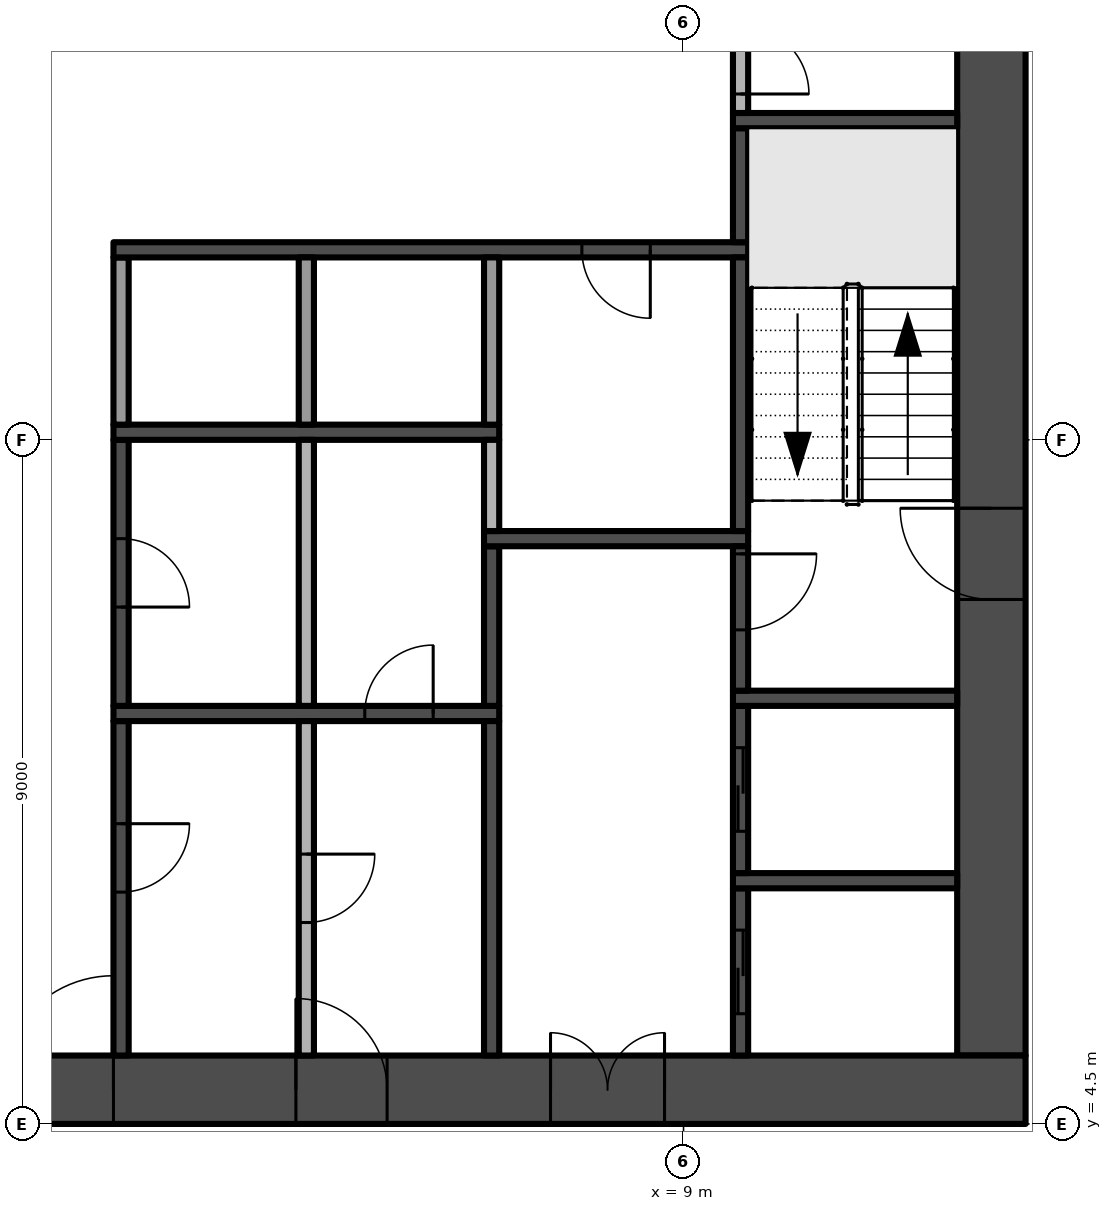
"""IFC4 building model, lengths in metres.
Left out: names, types, materials, properties, quantities, classifications, styles, units other than length and angle.
Written with IfcOpenShell. Run it as: python <this file> out.ifc"""

import sys

from ifc_helpers import new_model, si_unit, direction, frame, frame_2d, origin, place, context, subcontext, project, spatial, rectangle, extrude, element, fill, save


model = new_model("IFC4")
c1 = context("Model", 3, precision=1e-05, world=origin(), true_north=direction((0.0, 1.0)))
c2 = subcontext(c1, "Body", "Model", "MODEL_VIEW")
j1 = project(units=[si_unit("LENGTHUNIT", "METRE"), si_unit("PLANEANGLEUNIT", "RADIAN")], contexts=[c1])
p1 = place(None, origin())
s1 = spatial("IfcSite", under=j1, at=p1, CompositionType="ELEMENT")
p2 = place(p1, origin())
s2 = spatial("IfcBuilding", under=s1, at=p2, CompositionType="ELEMENT")
p3 = place(p2, frame((0.0, 0.0, 34.0)))
s3 = spatial("IfcBuildingStorey", under=s2, at=p3, CompositionType="ELEMENT", Elevation=34.0)
p4 = place(p3, frame((-13.5, 4.95, -0.3), z_axis=(0.0, 0.0, 1.0), x_axis=(1.0, 0.0, 0.0)))
e1 = element("IfcWall", 1, at=p4, inside=s3, PredefinedType="SHEAR", context=c2, shape_type="SweptSolid", body=[
    extrude(rectangle(XDim=27.0, YDim=0.9, at=frame_2d((13.5, 0.0))), origin(), (0.0, 0.0, 1.0), 3.8),
])
p5 = place(p4, frame((12.0, 0.0, 0.3)))
e2 = element("IfcOpeningElement", 2, at=p5, cuts=e1, PredefinedType="OPENING", context=c2, shape_type="SweptSolid", body=[
    extrude(rectangle(XDim=3.0, YDim=2.4, at=frame_2d((1.5, 1.2))), frame((0.0, 0.46, 0.0), z_axis=(0.0, -1.0, 0.0), x_axis=(1.0, 0.0, 0.0)), (0.0, 0.0, 1.0), 0.92),
])
p6 = place(p4, frame((4.9, 0.0, 0.3)))
e3 = element("IfcOpeningElement", 3, at=p6, cuts=e1, PredefinedType="OPENING", context=c2, shape_type="SweptSolid", body=[
    extrude(rectangle(XDim=1.2, YDim=2.2, at=frame_2d((0.6, 1.1))), frame((0.0, 0.46, 0.0), z_axis=(0.0, -1.0, 0.0), x_axis=(1.0, 0.0, 0.0)), (0.0, 0.0, 1.0), 0.92),
])
p7 = place(p4, frame((20.75, 0.0, 0.3)))
e4 = element("IfcOpeningElement", 4, at=p7, cuts=e1, PredefinedType="OPENING", context=c2, shape_type="SweptSolid", body=[
    extrude(rectangle(XDim=1.5, YDim=2.2, at=frame_2d((0.75, 1.1))), frame((0.0, 0.46, 0.0), z_axis=(0.0, -1.0, 0.0), x_axis=(1.0, 0.0, 0.0)), (0.0, 0.0, 1.0), 0.92),
])
p8 = place(p4, frame((17.4, 0.0, 0.3)))
e5 = element("IfcOpeningElement", 5, at=p8, cuts=e1, PredefinedType="OPENING", context=c2, shape_type="SweptSolid", body=[
    extrude(rectangle(XDim=1.2, YDim=2.2, at=frame_2d((0.6, 1.1))), frame((0.0, 0.46, 0.0), z_axis=(0.0, -1.0, 0.0), x_axis=(1.0, 0.0, 0.0)), (0.0, 0.0, 1.0), 0.92),
])
p9 = place(p3, frame((13.05, 5.4, -0.3), z_axis=(0.0, 0.0, 1.0), x_axis=(0.0, 1.0, 0.0)))
e6 = element("IfcWall", 6, at=p9, inside=s3, PredefinedType="SHEAR", context=c2, shape_type="SweptSolid", body=[
    extrude(rectangle(XDim=16.2, YDim=0.9, at=frame_2d((8.1, 0.0))), origin(), (0.0, 0.0, 1.0), 3.8),
])
p10 = place(p9, frame((6.0, 0.0, 0.3)))
e7 = element("IfcOpeningElement", 7, at=p10, cuts=e6, PredefinedType="OPENING", context=c2, shape_type="SweptSolid", body=[
    extrude(rectangle(XDim=1.2, YDim=2.2, at=frame_2d((0.6, 1.1))), frame((0.0, 0.46, 0.0), z_axis=(0.0, -1.0, 0.0), x_axis=(1.0, 0.0, 0.0)), (0.0, 0.0, 1.0), 0.92),
])
p11 = place(p3, frame((1.6, 9.8, 0.0), z_axis=(0.0, 0.0, 1.0), x_axis=(0.0, -1.0, 0.0)))
e8 = element("IfcWall", 8, at=p11, inside=s3, PredefinedType="SHEAR", context=c2, shape_type="SweptSolid", body=[
    extrude(rectangle(XDim=4.4, YDim=0.2, at=frame_2d((2.2, 0.0))), origin(), (0.0, 0.0, 1.0), 3.5),
])
p12 = place(p11, frame((1.35, 0.0, 0.0)))
e9 = element("IfcOpeningElement", 9, at=p12, cuts=e8, PredefinedType="OPENING", context=c2, shape_type="SweptSolid", body=[
    extrude(rectangle(XDim=0.9, YDim=2.1, at=frame_2d((0.45, 1.05))), frame((0.0, 0.11, 0.0), z_axis=(0.0, -1.0, 0.0), x_axis=(1.0, 0.0, 0.0)), (0.0, 0.0, 1.0), 0.22),
])
p13 = place(p3, frame((1.5, 9.9, 0.0), z_axis=(0.0, 0.0, 1.0), x_axis=(1.0, 0.0, 0.0)))
e10 = element("IfcWall", 10, at=p13, inside=s3, PredefinedType="SHEAR", context=c2, shape_type="SweptSolid", body=[
    extrude(rectangle(XDim=5.075, YDim=0.2, at=frame_2d((2.538, 0.0))), origin(), (0.0, 0.0, 1.0), 3.5),
])
p14 = place(p13, frame((3.306, 0.0, 0.0)))
e11 = element("IfcOpeningElement", 11, at=p14, cuts=e10, PredefinedType="OPENING", context=c2, shape_type="SweptSolid", body=[
    extrude(rectangle(XDim=0.9, YDim=2.1, at=frame_2d((0.45, 1.05))), frame((0.0, 0.11, 0.0), z_axis=(0.0, -1.0, 0.0), x_axis=(1.0, 0.0, 0.0)), (0.0, 0.0, 1.0), 0.22),
])
p15 = place(p3, frame((1.6, 13.5, 0.0), z_axis=(0.0, 0.0, 1.0), x_axis=(0.0, -1.0, 0.0)))
e12 = element("IfcWall", 12, at=p15, inside=s3, PredefinedType="SHEAR", context=c2, shape_type="SweptSolid", body=[
    extrude(rectangle(XDim=3.5, YDim=0.2, at=frame_2d((1.75, 0.0))), origin(), (0.0, 0.0, 1.0), 3.5),
])
p16 = place(p15, frame((1.3, 0.0, 0.0)))
e13 = element("IfcOpeningElement", 13, at=p16, cuts=e12, PredefinedType="OPENING", context=c2, shape_type="SweptSolid", body=[
    extrude(rectangle(XDim=0.9, YDim=2.1, at=frame_2d((0.45, 1.05))), frame((0.0, 0.11, 0.0), z_axis=(0.0, -1.0, 0.0), x_axis=(1.0, 0.0, 0.0)), (0.0, 0.0, 1.0), 0.22),
])
p17 = place(p3, frame((1.5, 13.6, 0.0), z_axis=(0.0, 0.0, 1.0), x_axis=(1.0, 0.0, 0.0)))
e14 = element("IfcWall", 14, at=p17, inside=s3, PredefinedType="SHEAR", context=c2, shape_type="SweptSolid", body=[
    extrude(rectangle(XDim=5.075, YDim=0.2, at=frame_2d((2.538, 0.0))), origin(), (0.0, 0.0, 1.0), 3.5),
])
p18 = place(p3, frame((1.6, 13.7, 0.0), z_axis=(0.0, 0.0, 1.0), x_axis=(0.0, 1.0, 0.0)))
e15 = element("IfcWall", 15, at=p18, inside=s3, PredefinedType="PARTITIONING", context=c2, shape_type="SweptSolid", body=[
    extrude(rectangle(XDim=2.2, YDim=0.2, at=frame_2d((1.1, 0.0))), origin(), (0.0, 0.0, 1.0), 3.5),
])
p19 = place(p3, frame((9.85, 16.0, 0.0), z_axis=(0.0, 0.0, 1.0), x_axis=(-1.0, 0.0, 0.0)))
e16 = element("IfcWall", 16, at=p19, inside=s3, PredefinedType="SHEAR", context=c2, shape_type="SweptSolid", body=[
    extrude(rectangle(XDim=8.35, YDim=0.2, at=frame_2d((4.175, 0.0))), origin(), (0.0, 0.0, 1.0), 3.5),
])
p20 = place(p19, frame((1.288, 0.0, 0.0)))
e17 = element("IfcOpeningElement", 17, at=p20, cuts=e16, PredefinedType="OPENING", context=c2, shape_type="SweptSolid", body=[
    extrude(rectangle(XDim=0.9, YDim=2.1, at=frame_2d((0.45, 1.05))), frame((0.0, 0.11, 0.0), z_axis=(0.0, -1.0, 0.0), x_axis=(1.0, 0.0, 0.0)), (0.0, 0.0, 1.0), 0.22),
])
p21 = place(p3, frame((4.037, 9.8, 0.0), z_axis=(0.0, 0.0, 1.0), x_axis=(0.0, -1.0, 0.0)))
e18 = element("IfcWall", 18, at=p21, inside=s3, PredefinedType="PARTITIONING", context=c2, shape_type="SweptSolid", body=[
    extrude(rectangle(XDim=4.4, YDim=0.2, at=frame_2d((2.2, 0.0))), origin(), (0.0, 0.0, 1.0), 3.5),
])
p22 = place(p21, frame((1.75, 0.0, 0.0)))
e19 = element("IfcOpeningElement", 19, at=p22, cuts=e18, PredefinedType="OPENING", context=c2, shape_type="SweptSolid", body=[
    extrude(rectangle(XDim=0.9, YDim=2.1, at=frame_2d((0.45, 1.05))), frame((0.0, 0.11, 0.0), z_axis=(0.0, -1.0, 0.0), x_axis=(1.0, 0.0, 0.0)), (0.0, 0.0, 1.0), 0.22),
])
p23 = place(p3, frame((4.037, 10.0, 0.0), z_axis=(0.0, 0.0, 1.0), x_axis=(0.0, 1.0, 0.0)))
e20 = element("IfcWall", 20, at=p23, inside=s3, PredefinedType="PARTITIONING", context=c2, shape_type="SweptSolid", body=[
    extrude(rectangle(XDim=3.5, YDim=0.2, at=frame_2d((1.75, 0.0))), origin(), (0.0, 0.0, 1.0), 3.5),
])
p24 = place(p3, frame((4.037, 13.7, 0.0), z_axis=(0.0, 0.0, 1.0), x_axis=(0.0, 1.0, 0.0)))
e21 = element("IfcWall", 21, at=p24, inside=s3, PredefinedType="PARTITIONING", context=c2, shape_type="SweptSolid", body=[
    extrude(rectangle(XDim=2.2, YDim=0.2, at=frame_2d((1.1, 0.0))), origin(), (0.0, 0.0, 1.0), 3.5),
])
p25 = place(p3, frame((6.475, 5.4, 0.0), z_axis=(0.0, 0.0, 1.0), x_axis=(0.0, 1.0, 0.0)))
e22 = element("IfcWall", 22, at=p25, inside=s3, PredefinedType="SHEAR", context=c2, shape_type="SweptSolid", body=[
    extrude(rectangle(XDim=4.4, YDim=0.2, at=frame_2d((2.2, 0.0))), origin(), (0.0, 0.0, 1.0), 3.5),
])
p26 = place(p3, frame((6.475, 10.0, 0.0), z_axis=(0.0, 0.0, 1.0), x_axis=(0.0, 1.0, 0.0)))
e23 = element("IfcWall", 23, at=p26, inside=s3, PredefinedType="SHEAR", context=c2, shape_type="SweptSolid", body=[
    extrude(rectangle(XDim=2.1, YDim=0.2, at=frame_2d((1.05, 0.0))), origin(), (0.0, 0.0, 1.0), 3.5),
])
p27 = place(p3, frame((6.375, 12.2, 0.0), z_axis=(0.0, 0.0, 1.0), x_axis=(1.0, 0.0, 0.0)))
e24 = element("IfcWall", 24, at=p27, inside=s3, PredefinedType="SHEAR", context=c2, shape_type="SweptSolid", body=[
    extrude(rectangle(XDim=3.475, YDim=0.2, at=frame_2d((1.738, 0.0))), origin(), (0.0, 0.0, 1.0), 3.5),
])
p28 = place(p3, frame((6.475, 12.3, 0.0), z_axis=(0.0, 0.0, 1.0), x_axis=(0.0, 1.0, 0.0)))
e25 = element("IfcWall", 25, at=p28, inside=s3, PredefinedType="PARTITIONING", context=c2, shape_type="SweptSolid", body=[
    extrude(rectangle(XDim=1.2, YDim=0.2, at=frame_2d((0.6, 0.0))), origin(), (0.0, 0.0, 1.0), 3.5),
])
p29 = place(p3, frame((6.475, 13.7, 0.0), z_axis=(0.0, 0.0, 1.0), x_axis=(0.0, 1.0, 0.0)))
e26 = element("IfcWall", 26, at=p29, inside=s3, PredefinedType="PARTITIONING", context=c2, shape_type="SweptSolid", body=[
    extrude(rectangle(XDim=2.2, YDim=0.2, at=frame_2d((1.1, 0.0))), origin(), (0.0, 0.0, 1.0), 3.5),
])
p30 = place(p3, frame((9.75, 5.4, 0.0), z_axis=(0.0, 0.0, 1.0), x_axis=(0.0, 1.0, 0.0)))
e27 = element("IfcWall", 27, at=p30, inside=s3, PredefinedType="SHEAR", context=c2, shape_type="SweptSolid", body=[
    extrude(rectangle(XDim=2.2, YDim=0.2, at=frame_2d((1.1, 0.0))), origin(), (0.0, 0.0, 1.0), 3.5),
])
p31 = place(p30, frame((0.55, 0.0, 0.0)))
e28 = element("IfcOpeningElement", 28, at=p31, cuts=e27, PredefinedType="OPENING", context=c2, shape_type="SweptSolid", body=[
    extrude(rectangle(XDim=1.1, YDim=2.1, at=frame_2d((0.55, 1.05))), frame((0.0, 0.11, 0.0), z_axis=(0.0, -1.0, 0.0), x_axis=(1.0, 0.0, 0.0)), (0.0, 0.0, 1.0), 0.22),
])
p32 = place(p3, frame((9.65, 7.7, 0.0), z_axis=(0.0, 0.0, 1.0), x_axis=(1.0, 0.0, 0.0)))
e29 = element("IfcWall", 29, at=p32, inside=s3, PredefinedType="SHEAR", context=c2, shape_type="SweptSolid", body=[
    extrude(rectangle(XDim=2.95, YDim=0.2, at=frame_2d((1.475, 0.0))), origin(), (0.0, 0.0, 1.0), 3.5),
])
p33 = place(p3, frame((9.75, 7.8, 0.0), z_axis=(0.0, 0.0, 1.0), x_axis=(0.0, 1.0, 0.0)))
e30 = element("IfcWall", 30, at=p33, inside=s3, PredefinedType="SHEAR", context=c2, shape_type="SweptSolid", body=[
    extrude(rectangle(XDim=2.2, YDim=0.2, at=frame_2d((1.1, 0.0))), origin(), (0.0, 0.0, 1.0), 3.5),
])
p34 = place(p33, frame((0.55, 0.0, 0.0)))
e31 = element("IfcOpeningElement", 31, at=p34, cuts=e30, PredefinedType="OPENING", context=c2, shape_type="SweptSolid", body=[
    extrude(rectangle(XDim=1.1, YDim=2.1, at=frame_2d((0.55, 1.05))), frame((0.0, 0.11, 0.0), z_axis=(0.0, -1.0, 0.0), x_axis=(1.0, 0.0, 0.0)), (0.0, 0.0, 1.0), 0.22),
])
p35 = place(p3, frame((9.65, 10.1, 0.0), z_axis=(0.0, 0.0, 1.0), x_axis=(1.0, 0.0, 0.0)))
e32 = element("IfcWall", 32, at=p35, inside=s3, PredefinedType="SHEAR", context=c2, shape_type="SweptSolid", body=[
    extrude(rectangle(XDim=2.95, YDim=0.2, at=frame_2d((1.475, 0.0))), origin(), (0.0, 0.0, 1.0), 3.5),
])
p36 = place(p3, frame((9.75, 12.1, 0.0), z_axis=(0.0, 0.0, 1.0), x_axis=(0.0, -1.0, 0.0)))
e33 = element("IfcWall", 33, at=p36, inside=s3, PredefinedType="SHEAR", context=c2, shape_type="SweptSolid", body=[
    extrude(rectangle(XDim=1.9, YDim=0.2, at=frame_2d((0.95, 0.0))), origin(), (0.0, 0.0, 1.0), 3.5),
])
p37 = place(p36, frame((0.1, 0.0, 0.0)))
e34 = element("IfcOpeningElement", 34, at=p37, cuts=e33, PredefinedType="OPENING", context=c2, shape_type="SweptSolid", body=[
    extrude(rectangle(XDim=1.0, YDim=2.2, at=frame_2d((0.5, 1.1))), frame((0.0, 0.11, 0.0), z_axis=(0.0, -1.0, 0.0), x_axis=(1.0, 0.0, 0.0)), (0.0, 0.0, 1.0), 0.22),
])
p38 = place(p3, frame((9.75, 12.3, 0.0), z_axis=(0.0, 0.0, 1.0), x_axis=(0.0, 1.0, 0.0)))
e35 = element("IfcWall", 35, at=p38, inside=s3, PredefinedType="SHEAR", context=c2, shape_type="SweptSolid", body=[
    extrude(rectangle(XDim=3.6, YDim=0.2, at=frame_2d((1.8, 0.0))), origin(), (0.0, 0.0, 1.0), 3.5),
])
p39 = place(p3, frame((9.75, 16.1, 0.0), z_axis=(0.0, 0.0, 1.0), x_axis=(0.0, 1.0, 0.0)))
e36 = element("IfcWall", 36, at=p39, inside=s3, PredefinedType="SHEAR", context=c2, shape_type="SweptSolid", body=[
    extrude(rectangle(XDim=1.5, YDim=0.2, at=frame_2d((0.75, 0.0))), origin(), (0.0, 0.0, 1.0), 3.5),
])
p40 = place(p3, frame((9.65, 17.7, 0.0), z_axis=(0.0, 0.0, 1.0), x_axis=(1.0, 0.0, 0.0)))
e37 = element("IfcWall", 37, at=p40, inside=s3, PredefinedType="SHEAR", context=c2, shape_type="SweptSolid", body=[
    extrude(rectangle(XDim=2.95, YDim=0.2, at=frame_2d((1.475, 0.0))), origin(), (0.0, 0.0, 1.0), 3.5),
])
p41 = place(p3, frame((9.75, 19.2, 0.0), z_axis=(0.0, 0.0, 1.0), x_axis=(0.0, -1.0, 0.0)))
e38 = element("IfcWall", 38, at=p41, inside=s3, PredefinedType="PARTITIONING", context=c2, shape_type="SweptSolid", body=[
    extrude(rectangle(XDim=1.4, YDim=0.2, at=frame_2d((0.7, 0.0))), origin(), (0.0, 0.0, 1.0), 3.5),
])
p42 = place(p41, frame((0.25, 0.0, 0.0)))
e39 = element("IfcOpeningElement", 39, at=p42, cuts=e38, PredefinedType="OPENING", context=c2, shape_type="SweptSolid", body=[
    extrude(rectangle(XDim=0.9, YDim=2.1, at=frame_2d((0.45, 1.05))), frame((0.0, 0.11, 0.0), z_axis=(0.0, -1.0, 0.0), x_axis=(1.0, 0.0, 0.0)), (0.0, 0.0, 1.0), 0.22),
])
p43 = place(p5, frame((3.0, 0.0, 0.0), z_axis=(0.0, 0.0, 1.0), x_axis=(-1.0, 0.0, 0.0)))
e40 = element("IfcDoor", 40, at=p43, inside=s3, OperationType="DOUBLE_DOOR_SINGLE_SWING", PredefinedType="DOOR", context=c2, shape_type="SweptSolid", body=[
    extrude(rectangle(XDim=3.0, YDim=2.4, at=frame_2d((1.5, 1.2))), frame((0.0, 0.025, 0.0), z_axis=(0.0, -1.0, 0.0), x_axis=(1.0, 0.0, 0.0)), (0.0, 0.0, 1.0), 0.05),
])
fill(e2, e40)
p44 = place(p10, frame((1.2, 0.0, 0.0), z_axis=(0.0, 0.0, 1.0), x_axis=(-1.0, 0.0, 0.0)))
e41 = element("IfcDoor", 41, at=p44, inside=s3, OperationType="SINGLE_SWING_LEFT", PredefinedType="DOOR", context=c2, shape_type="SweptSolid", body=[
    extrude(rectangle(XDim=1.2, YDim=2.2, at=frame_2d((0.6, 1.1))), frame((0.0, 0.025, 0.0), z_axis=(0.0, -1.0, 0.0), x_axis=(1.0, 0.0, 0.0)), (0.0, 0.0, 1.0), 0.05),
])
fill(e7, e41)
p45 = place(p7, frame((1.5, 0.0, 0.0), z_axis=(0.0, 0.0, 1.0), x_axis=(-1.0, 0.0, 0.0)))
e42 = element("IfcDoor", 42, at=p45, inside=s3, OperationType="DOUBLE_DOOR_SINGLE_SWING", PredefinedType="DOOR", context=c2, shape_type="SweptSolid", body=[
    extrude(rectangle(XDim=1.5, YDim=2.2, at=frame_2d((0.75, 1.1))), frame((0.0, 0.025, 0.0), z_axis=(0.0, -1.0, 0.0), x_axis=(1.0, 0.0, 0.0)), (0.0, 0.0, 1.0), 0.05),
])
fill(e4, e42)
p46 = place(p8, frame((1.2, 0.0, 0.0), z_axis=(0.0, 0.0, 1.0), x_axis=(-1.0, 0.0, 0.0)))
e43 = element("IfcDoor", 43, at=p46, inside=s3, OperationType="SINGLE_SWING_RIGHT", PredefinedType="DOOR", context=c2, shape_type="SweptSolid", body=[
    extrude(rectangle(XDim=1.2, YDim=2.2, at=frame_2d((0.6, 1.1))), frame((0.0, 0.025, 0.0), z_axis=(0.0, -1.0, 0.0), x_axis=(1.0, 0.0, 0.0)), (0.0, 0.0, 1.0), 0.05),
])
fill(e5, e43)
p47 = place(p37, origin())
e44 = element("IfcDoor", 44, at=p47, inside=s3, OperationType="SINGLE_SWING_LEFT", PredefinedType="DOOR", context=c2, shape_type="SweptSolid", body=[
    extrude(rectangle(XDim=1.0, YDim=2.2, at=frame_2d((0.5, 1.1))), frame((0.0, 0.025, 0.0), z_axis=(0.0, -1.0, 0.0), x_axis=(1.0, 0.0, 0.0)), (0.0, 0.0, 1.0), 0.05),
])
fill(e34, e44)
p48 = place(p31, origin())
e45 = element("IfcDoor", 45, at=p48, inside=s3, OperationType="SLIDING_TO_RIGHT", PredefinedType="DOOR", context=c2, shape_type="SweptSolid", body=[
    extrude(rectangle(XDim=1.1, YDim=2.1, at=frame_2d((0.55, 1.05))), frame((0.0, 0.025, 0.0), z_axis=(0.0, -1.0, 0.0), x_axis=(1.0, 0.0, 0.0)), (0.0, 0.0, 1.0), 0.05),
])
fill(e28, e45)
p49 = place(p34, origin())
e46 = element("IfcDoor", 46, at=p49, inside=s3, OperationType="SLIDING_TO_RIGHT", PredefinedType="DOOR", context=c2, shape_type="SweptSolid", body=[
    extrude(rectangle(XDim=1.1, YDim=2.1, at=frame_2d((0.55, 1.05))), frame((0.0, 0.025, 0.0), z_axis=(0.0, -1.0, 0.0), x_axis=(1.0, 0.0, 0.0)), (0.0, 0.0, 1.0), 0.05),
])
fill(e31, e46)
p50 = place(p12, origin())
e47 = element("IfcDoor", 47, at=p50, inside=s3, OperationType="SINGLE_SWING_LEFT", PredefinedType="DOOR", context=c2, shape_type="SweptSolid", body=[
    extrude(rectangle(XDim=0.9, YDim=2.1, at=frame_2d((0.45, 1.05))), frame((0.0, 0.025, 0.0), z_axis=(0.0, -1.0, 0.0), x_axis=(1.0, 0.0, 0.0)), (0.0, 0.0, 1.0), 0.05),
])
fill(e9, e47)
p51 = place(p22, origin())
e48 = element("IfcDoor", 48, at=p51, inside=s3, OperationType="SINGLE_SWING_LEFT", PredefinedType="DOOR", context=c2, shape_type="SweptSolid", body=[
    extrude(rectangle(XDim=0.9, YDim=2.1, at=frame_2d((0.45, 1.05))), frame((0.0, 0.025, 0.0), z_axis=(0.0, -1.0, 0.0), x_axis=(1.0, 0.0, 0.0)), (0.0, 0.0, 1.0), 0.05),
])
fill(e19, e48)
p52 = place(p16, origin())
e49 = element("IfcDoor", 49, at=p52, inside=s3, OperationType="SINGLE_SWING_RIGHT", PredefinedType="DOOR", context=c2, shape_type="SweptSolid", body=[
    extrude(rectangle(XDim=0.9, YDim=2.1, at=frame_2d((0.45, 1.05))), frame((0.0, 0.025, 0.0), z_axis=(0.0, -1.0, 0.0), x_axis=(1.0, 0.0, 0.0)), (0.0, 0.0, 1.0), 0.05),
])
fill(e13, e49)
p53 = place(p14, origin())
e50 = element("IfcDoor", 50, at=p53, inside=s3, OperationType="SINGLE_SWING_RIGHT", PredefinedType="DOOR", context=c2, shape_type="SweptSolid", body=[
    extrude(rectangle(XDim=0.9, YDim=2.1, at=frame_2d((0.45, 1.05))), frame((0.0, 0.025, 0.0), z_axis=(0.0, -1.0, 0.0), x_axis=(1.0, 0.0, 0.0)), (0.0, 0.0, 1.0), 0.05),
])
fill(e11, e50)
p54 = place(p20, origin())
e51 = element("IfcDoor", 51, at=p54, inside=s3, OperationType="SINGLE_SWING_LEFT", PredefinedType="DOOR", context=c2, shape_type="SweptSolid", body=[
    extrude(rectangle(XDim=0.9, YDim=2.1, at=frame_2d((0.45, 1.05))), frame((0.0, 0.025, 0.0), z_axis=(0.0, -1.0, 0.0), x_axis=(1.0, 0.0, 0.0)), (0.0, 0.0, 1.0), 0.05),
])
fill(e17, e51)
p55 = place(p42, origin())
e52 = element("IfcDoor", 52, at=p55, inside=s3, OperationType="SINGLE_SWING_RIGHT", PredefinedType="DOOR", context=c2, shape_type="SweptSolid", body=[
    extrude(rectangle(XDim=0.9, YDim=2.1, at=frame_2d((0.45, 1.05))), frame((0.0, 0.025, 0.0), z_axis=(0.0, -1.0, 0.0), x_axis=(1.0, 0.0, 0.0)), (0.0, 0.0, 1.0), 0.05),
])
fill(e39, e52)
save(model, sys.argv[1])
